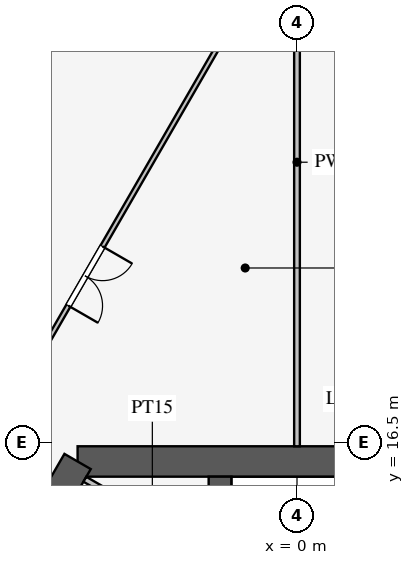
"""IFC4 building model, lengths in metres.
Left out: names, types, materials, properties, quantities, classifications, styles, units other than length and angle.
Written with IfcOpenShell. Run it as: python <this file> out.ifc"""

import sys

from ifc_helpers import new_model, si_unit, direction, frame, frame_2d, origin, place, context, subcontext, project, spatial, rectangle, extrude, element, fill, save


model = new_model("IFC4")
c1 = context("Model", 3, precision=1e-05, world=origin(), true_north=direction((0.0, 1.0)))
c2 = subcontext(c1, "Body", "Model", "MODEL_VIEW")
j1 = project(units=[si_unit("LENGTHUNIT", "METRE"), si_unit("PLANEANGLEUNIT", "RADIAN")], contexts=[c1])
p1 = place(None, origin())
s1 = spatial("IfcSite", under=j1, at=p1, CompositionType="ELEMENT")
p2 = place(p1, origin())
s2 = spatial("IfcBuilding", under=s1, at=p2, CompositionType="ELEMENT")
p3 = place(p2, frame((0.0, 0.0, 214.9)))
s3 = spatial("IfcBuildingStorey", under=s2, at=p3, CompositionType="ELEMENT", Elevation=214.9)
p4 = place(p3, frame((5.773, 16.0, 0.0), z_axis=(0.0, 0.0, 1.0), x_axis=(-1.0, 0.0, 0.0)))
e1 = element("IfcWall", 1, at=p4, inside=s3, PredefinedType="SHEAR", context=c2, shape_type="SweptSolid", body=[
    extrude(rectangle(XDim=11.547, YDim=0.8, at=frame_2d((5.773, 0.0))), origin(), (0.0, 0.0, 1.0), 4.2),
])
p5 = place(p3, frame((-5.773, 16.0, 0.0), z_axis=(0.0, 0.0, 1.0), x_axis=(-0.500002442456, -0.866023993627, 0.0)))
e2 = element("IfcWall", 2, at=p5, inside=s3, PredefinedType="SHEAR", context=c2, shape_type="SweptSolid", body=[
    extrude(rectangle(XDim=21.939, YDim=0.8, at=frame_2d((10.97, 0.0))), origin(), (0.0, 0.0, 1.0), 4.2),
])
p6 = place(p5, frame((17.27, 0.0, 0.0)))
e3 = element("IfcOpeningElement", 3, at=p6, cuts=e2, PredefinedType="OPENING", context=c2, shape_type="SweptSolid", body=[
    extrude(rectangle(XDim=1.2, YDim=2.1, at=frame_2d((0.6, 1.05))), frame((0.0, 0.41, 0.0), z_axis=(0.0, -1.0, 0.0), x_axis=(1.0, 0.0, 0.0)), (0.0, 0.0, 1.0), 0.82),
])
p7 = place(p5, frame((3.47, 0.0, 0.0)))
e4 = element("IfcOpeningElement", 4, at=p7, cuts=e2, PredefinedType="OPENING", context=c2, shape_type="SweptSolid", body=[
    extrude(rectangle(XDim=1.2, YDim=2.1, at=frame_2d((0.6, 1.05))), frame((0.0, 0.41, 0.0), z_axis=(0.0, -1.0, 0.0), x_axis=(1.0, 0.0, 0.0)), (0.0, 0.0, 1.0), 0.82),
])
p8 = place(p3, frame((-2.025, 6.525, 0.0), z_axis=(0.0, 0.0, 1.0), x_axis=(0.0, 1.0, 0.0)))
e5 = element("IfcWall", 5, at=p8, inside=s3, PredefinedType="SHEAR", context=c2, shape_type="SweptSolid", body=[
    extrude(rectangle(XDim=9.075, YDim=0.6, at=frame_2d((4.538, 0.0))), origin(), (0.0, 0.0, 1.0), 4.2),
])
p9 = place(p3, frame((-2.031, 13.482, 0.0), z_axis=(0.0, 0.0, 1.0), x_axis=(-0.866050731258, 0.499956128963, 0.0)))
e6 = element("IfcWall", 6, at=p9, inside=s3, PredefinedType="PARTITIONING", context=c2, shape_type="SweptSolid", body=[
    extrude(rectangle(XDim=4.1, YDim=0.15, at=frame_2d((2.05, 0.0))), origin(), (0.0, 0.0, 1.0), 4.0),
])
p10 = place(p3, frame((0.0, 16.4, 0.0), z_axis=(0.0, 0.0, 1.0), x_axis=(0.0, 1.0, 0.0)))
e7 = element("IfcWall", 7, at=p10, inside=s3, PredefinedType="PARTITIONING", context=c2, shape_type="SweptSolid", body=[
    extrude(rectangle(XDim=14.95, YDim=0.15, at=frame_2d((7.475, 0.0))), origin(), (0.0, 0.0, 1.0), 2.4),
])
p11 = place(p3, frame((-0.016, 30.491, 0.0), z_axis=(0.0, 0.0, 1.0), x_axis=(-0.50000091641, -0.866024874695, 0.0)))
e8 = element("IfcWall", 8, at=p11, inside=s3, PredefinedType="PARTITIONING", context=c2, shape_type="SweptSolid", body=[
    extrude(rectangle(XDim=52.796, YDim=0.12, at=frame_2d((26.398, 0.0))), origin(), (0.0, 0.0, 1.0), 2.9),
])
p12 = place(p11, frame((10.2, 0.0, 0.15)))
e9 = element("IfcOpeningElement", 9, at=p12, cuts=e8, PredefinedType="OPENING", context=c2, shape_type="SweptSolid", body=[
    extrude(rectangle(XDim=1.8, YDim=2.1, at=frame_2d((0.9, 1.05))), frame((0.0, 0.07, 0.0), z_axis=(0.0, -1.0, 0.0), x_axis=(1.0, 0.0, 0.0)), (0.0, 0.0, 1.0), 0.14),
])
p13 = place(p11, frame((40.8, 0.0, 0.15)))
e10 = element("IfcOpeningElement", 10, at=p13, cuts=e8, PredefinedType="OPENING", context=c2, shape_type="SweptSolid", body=[
    extrude(rectangle(XDim=1.8, YDim=2.1, at=frame_2d((0.9, 1.05))), frame((0.0, 0.07, 0.0), z_axis=(0.0, -1.0, 0.0), x_axis=(1.0, 0.0, 0.0)), (0.0, 0.0, 1.0), 0.14),
])
p14 = place(p12, origin())
e11 = element("IfcDoor", 11, at=p14, inside=s3, OperationType="DOUBLE_DOOR_SINGLE_SWING", PredefinedType="DOOR", context=c2, shape_type="SweptSolid", body=[
    extrude(rectangle(XDim=1.8, YDim=2.1, at=frame_2d((0.9, 1.05))), frame((0.0, 0.025, 0.0), z_axis=(0.0, -1.0, 0.0), x_axis=(1.0, 0.0, 0.0)), (0.0, 0.0, 1.0), 0.05),
])
fill(e9, e11)
save(model, sys.argv[1])
